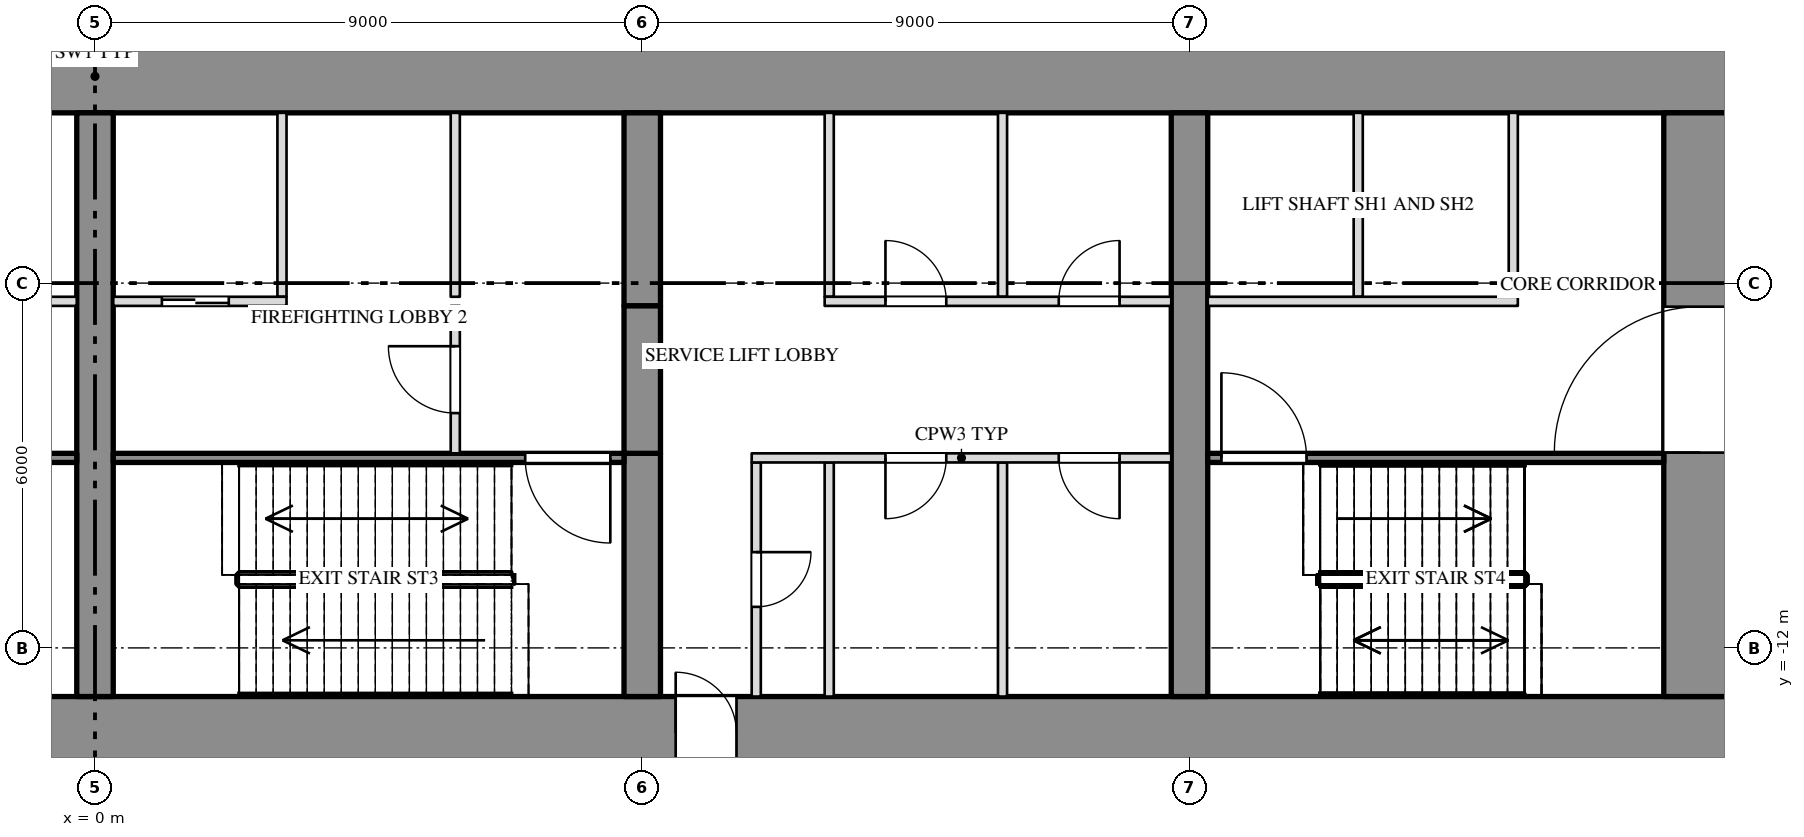
"""IFC4 building model, lengths in metres.
Left out: names, types, materials, properties, quantities, classifications, styles, units other than length and angle.
Written with IfcOpenShell. Run it as: python <this file> out.ifc"""

import sys

from ifc_helpers import new_model, si_unit, direction, frame, frame_2d, origin, place, context, subcontext, project, spatial, rectangle, extrude, element, fill, save


model = new_model("IFC4")
c1 = context("Model", 3, precision=1e-05, world=origin(), true_north=direction((0.0, 1.0)))
c2 = subcontext(c1, "Body", "Model", "MODEL_VIEW")
j1 = project(units=[si_unit("LENGTHUNIT", "METRE"), si_unit("PLANEANGLEUNIT", "RADIAN")], contexts=[c1])
p1 = place(None, origin())
s1 = spatial("IfcSite", under=j1, at=p1, CompositionType="ELEMENT")
p2 = place(p1, origin())
s2 = spatial("IfcBuilding", under=s1, at=p2, CompositionType="ELEMENT")
p3 = place(p2, frame((0.0, 0.0, 27.0)))
s3 = spatial("IfcBuildingStorey", under=s2, at=p3, CompositionType="ELEMENT", Elevation=27.0)
p4 = place(p3, frame((-27.0, -2.6, 0.0), z_axis=(0.0, 0.0, 1.0), x_axis=(1.0, 0.0, 0.0)))
e1 = element("IfcWall", 1, at=p4, inside=s3, PredefinedType="SHEAR", context=c2, shape_type="SweptSolid", body=[
    extrude(rectangle(XDim=54.0, YDim=1.2, at=frame_2d((27.0, 0.0))), origin(), (0.0, 0.0, 1.0), 5.7),
])
p5 = place(p3, frame((-27.0, -13.4, 0.0), z_axis=(0.0, 0.0, 1.0), x_axis=(1.0, 0.0, 0.0)))
e2 = element("IfcWall", 2, at=p5, inside=s3, PredefinedType="SHEAR", context=c2, shape_type="SweptSolid", body=[
    extrude(rectangle(XDim=54.0, YDim=1.2, at=frame_2d((27.0, 0.0))), origin(), (0.0, 0.0, 1.0), 5.7),
])
p6 = place(p5, frame((16.45, 0.0, 0.0)))
e3 = element("IfcOpeningElement", 3, at=p6, cuts=e2, PredefinedType="OPENING", context=c2, shape_type="SweptSolid", body=[
    extrude(rectangle(XDim=1.0, YDim=2.1, at=frame_2d((0.5, 1.05))), frame((0.0, 0.612, 0.0), z_axis=(0.0, -1.0, 0.0), x_axis=(1.0, 0.0, 0.0)), (0.0, 0.0, 1.0), 1.224),
])
p7 = place(p5, frame((36.55, 0.0, 0.0)))
e4 = element("IfcOpeningElement", 4, at=p7, cuts=e2, PredefinedType="OPENING", context=c2, shape_type="SweptSolid", body=[
    extrude(rectangle(XDim=1.0, YDim=2.1, at=frame_2d((0.5, 1.05))), frame((0.0, 0.612, 0.0), z_axis=(0.0, -1.0, 0.0), x_axis=(1.0, 0.0, 0.0)), (0.0, 0.0, 1.0), 1.224),
])
p8 = place(p3, frame((26.4, -12.8, 0.0), z_axis=(0.0, 0.0, 1.0), x_axis=(0.0, 1.0, 0.0)))
e5 = element("IfcWall", 5, at=p8, inside=s3, PredefinedType="SHEAR", context=c2, shape_type="SweptSolid", body=[
    extrude(rectangle(XDim=9.6, YDim=1.2, at=frame_2d((4.8, 0.0))), origin(), (0.0, 0.0, 1.0), 5.7),
])
p9 = place(p8, frame((4.012, 0.0, 0.0)))
e6 = element("IfcOpeningElement", 6, at=p9, cuts=e5, PredefinedType="OPENING", context=c2, shape_type="SweptSolid", body=[
    extrude(rectangle(XDim=2.4, YDim=2.1, at=frame_2d((1.2, 1.05))), frame((0.0, 0.612, 0.0), z_axis=(0.0, -1.0, 0.0), x_axis=(1.0, 0.0, 0.0)), (0.0, 0.0, 1.0), 1.224),
])
p10 = place(p3, frame((0.0, -12.8, 0.0), z_axis=(0.0, 0.0, 1.0), x_axis=(0.0, 1.0, 0.0)))
e7 = element("IfcWall", 7, at=p10, inside=s3, PredefinedType="SHEAR", context=c2, shape_type="SweptSolid", body=[
    extrude(rectangle(XDim=9.6, YDim=0.6, at=frame_2d((4.8, 0.0))), origin(), (0.0, 0.0, 1.0), 5.7),
])
p11 = place(p3, frame((9.0, -12.8, 0.0), z_axis=(0.0, 0.0, 1.0), x_axis=(0.0, 1.0, 0.0)))
e8 = element("IfcWall", 8, at=p11, inside=s3, PredefinedType="SHEAR", context=c2, shape_type="SweptSolid", body=[
    extrude(rectangle(XDim=4.0, YDim=0.6, at=frame_2d((2.0, 0.0))), origin(), (0.0, 0.0, 1.0), 5.7),
])
p12 = place(p3, frame((9.0, -6.375, 0.0), z_axis=(0.0, 0.0, 1.0), x_axis=(0.0, 1.0, 0.0)))
e9 = element("IfcWall", 9, at=p12, inside=s3, PredefinedType="SHEAR", context=c2, shape_type="SweptSolid", body=[
    extrude(rectangle(XDim=3.175, YDim=0.6, at=frame_2d((1.587, 0.0))), origin(), (0.0, 0.0, 1.0), 5.7),
])
p13 = place(p3, frame((9.0, -8.8, 3.6), z_axis=(0.0, 0.0, 1.0), x_axis=(0.0, 1.0, 0.0)))
e10 = element("IfcWall", 10, at=p13, inside=s3, PredefinedType="SHEAR", context=c2, shape_type="SweptSolid", body=[
    extrude(rectangle(XDim=2.425, YDim=0.6, at=frame_2d((1.212, 0.0))), origin(), (0.0, 0.0, 1.0), 2.1),
])
p14 = place(p3, frame((18.0, -12.8, 0.0), z_axis=(0.0, 0.0, 1.0), x_axis=(0.0, 1.0, 0.0)))
e11 = element("IfcWall", 11, at=p14, inside=s3, PredefinedType="SHEAR", context=c2, shape_type="SweptSolid", body=[
    extrude(rectangle(XDim=9.6, YDim=0.6, at=frame_2d((4.8, 0.0))), origin(), (0.0, 0.0, 1.0), 5.7),
])
for number, where, z_axis, x_axis in (
    (12, (3.075, -6.225, 0.0), (0.0, 0.0, 1.0), (0.0, 1.0, 0.0)),
    (13, (5.925, -6.225, 0.0), (0.0, 0.0, 1.0), (0.0, 1.0, 0.0)),
    (14, (12.075, -6.225, 0.0), (0.0, 0.0, 1.0), (0.0, 1.0, 0.0)),
    (15, (14.925, -6.225, 0.0), (0.0, 0.0, 1.0), (0.0, 1.0, 0.0)),
    (16, (20.775, -6.225, 0.0), (0.0, 0.0, 1.0), (0.0, 1.0, 0.0)),
    (17, (23.325, -6.225, 0.0), (0.0, 0.0, 1.0), (0.0, 1.0, 0.0)),
):
    element("IfcWall", number, at=place(p3, frame(where, z_axis=z_axis, x_axis=x_axis)), inside=s3, PredefinedType="PARTITIONING", context=c2, shape_type="SweptSolid", body=[
        extrude(rectangle(XDim=3.025, YDim=0.15, at=frame_2d((1.513, 0.0))), origin(), (0.0, 0.0, 1.0), 5.7),
    ])
p15 = place(p3, frame((10.875, -12.8, 0.0), z_axis=(0.0, 0.0, 1.0), x_axis=(0.0, 1.0, 0.0)))
e18 = element("IfcWall", 18, at=p15, inside=s3, PredefinedType="PARTITIONING", context=c2, shape_type="SweptSolid", body=[
    extrude(rectangle(XDim=3.85, YDim=0.15, at=frame_2d((1.925, 0.0))), origin(), (0.0, 0.0, 1.0), 5.7),
])
p16 = place(p15, frame((1.475, 0.0, 0.0)))
e19 = element("IfcOpeningElement", 19, at=p16, cuts=e18, PredefinedType="OPENING", context=c2, shape_type="SweptSolid", body=[
    extrude(rectangle(XDim=0.9, YDim=2.1, at=frame_2d((0.45, 1.05))), frame((0.0, 0.087, 0.0), z_axis=(0.0, -1.0, 0.0), x_axis=(1.0, 0.0, 0.0)), (0.0, 0.0, 1.0), 0.174),
])
for number, where, z_axis, x_axis in (
    (20, (12.075, -12.8, 0.0), (0.0, 0.0, 1.0), (0.0, 1.0, 0.0)),
    (21, (14.925, -12.8, 0.0), (0.0, 0.0, 1.0), (0.0, 1.0, 0.0)),
):
    element("IfcWall", number, at=place(p3, frame(where, z_axis=z_axis, x_axis=x_axis)), inside=s3, PredefinedType="PARTITIONING", context=c2, shape_type="SweptSolid", body=[
        extrude(rectangle(XDim=3.85, YDim=0.15, at=frame_2d((1.925, 0.0))), origin(), (0.0, 0.0, 1.0), 5.7),
    ])
p17 = place(p3, frame((5.925, -8.8, 0.0), z_axis=(0.0, 0.0, 1.0), x_axis=(0.0, 1.0, 0.0)))
e22 = element("IfcWall", 22, at=p17, inside=s3, PredefinedType="PARTITIONING", context=c2, shape_type="SweptSolid", body=[
    extrude(rectangle(XDim=2.425, YDim=0.15, at=frame_2d((1.212, 0.0))), origin(), (0.0, 0.0, 1.0), 5.7),
])
p18 = place(p17, frame((0.662, 0.0, 0.0)))
e23 = element("IfcOpeningElement", 23, at=p18, cuts=e22, PredefinedType="OPENING", context=c2, shape_type="SweptSolid", body=[
    extrude(rectangle(XDim=1.1, YDim=2.1, at=frame_2d((0.55, 1.05))), frame((0.0, 0.087, 0.0), z_axis=(0.0, -1.0, 0.0), x_axis=(1.0, 0.0, 0.0)), (0.0, 0.0, 1.0), 0.174),
])
p19 = place(p3, frame((-3.15, -6.3, 0.0), z_axis=(0.0, 0.0, 1.0), x_axis=(1.0, 0.0, 0.0)))
e24 = element("IfcWall", 24, at=p19, inside=s3, PredefinedType="PARTITIONING", context=c2, shape_type="SweptSolid", body=[
    extrude(rectangle(XDim=2.85, YDim=0.15, at=frame_2d((1.425, 0.0))), origin(), (0.0, 0.0, 1.0), 5.7),
])
p20 = place(p19, frame((0.95, 0.0, 0.0)))
e25 = element("IfcOpeningElement", 25, at=p20, cuts=e24, PredefinedType="OPENING", context=c2, shape_type="SweptSolid", body=[
    extrude(rectangle(XDim=1.1, YDim=2.1, at=frame_2d((0.55, 1.05))), frame((0.0, 0.087, 0.0), z_axis=(0.0, -1.0, 0.0), x_axis=(1.0, 0.0, 0.0)), (0.0, 0.0, 1.0), 0.174),
])
p21 = place(p3, frame((0.3, -6.3, 0.0), z_axis=(0.0, 0.0, 1.0), x_axis=(1.0, 0.0, 0.0)))
e26 = element("IfcWall", 26, at=p21, inside=s3, PredefinedType="PARTITIONING", context=c2, shape_type="SweptSolid", body=[
    extrude(rectangle(XDim=2.85, YDim=0.15, at=frame_2d((1.425, 0.0))), origin(), (0.0, 0.0, 1.0), 5.7),
])
p22 = place(p21, frame((0.8, 0.0, 0.0)))
e27 = element("IfcOpeningElement", 27, at=p22, cuts=e26, PredefinedType="OPENING", context=c2, shape_type="SweptSolid", body=[
    extrude(rectangle(XDim=1.1, YDim=2.1, at=frame_2d((0.55, 1.05))), frame((0.0, 0.087, 0.0), z_axis=(0.0, -1.0, 0.0), x_axis=(1.0, 0.0, 0.0)), (0.0, 0.0, 1.0), 0.174),
])
p23 = place(p3, frame((12.0, -6.3, 0.0), z_axis=(0.0, 0.0, 1.0), x_axis=(1.0, 0.0, 0.0)))
e28 = element("IfcWall", 28, at=p23, inside=s3, PredefinedType="PARTITIONING", context=c2, shape_type="SweptSolid", body=[
    extrude(rectangle(XDim=5.7, YDim=0.15, at=frame_2d((2.85, 0.0))), origin(), (0.0, 0.0, 1.0), 5.7),
])
p24 = place(p23, frame((1.0, 0.0, 0.0)))
e29 = element("IfcOpeningElement", 29, at=p24, cuts=e28, PredefinedType="OPENING", context=c2, shape_type="SweptSolid", body=[
    extrude(rectangle(XDim=1.0, YDim=2.1, at=frame_2d((0.5, 1.05))), frame((0.0, 0.087, 0.0), z_axis=(0.0, -1.0, 0.0), x_axis=(1.0, 0.0, 0.0)), (0.0, 0.0, 1.0), 0.174),
])
p25 = place(p23, frame((3.85, 0.0, 0.0)))
e30 = element("IfcOpeningElement", 30, at=p25, cuts=e28, PredefinedType="OPENING", context=c2, shape_type="SweptSolid", body=[
    extrude(rectangle(XDim=1.0, YDim=2.1, at=frame_2d((0.5, 1.05))), frame((0.0, 0.087, 0.0), z_axis=(0.0, -1.0, 0.0), x_axis=(1.0, 0.0, 0.0)), (0.0, 0.0, 1.0), 0.174),
])
p26 = place(p3, frame((18.3, -6.3, 0.0), z_axis=(0.0, 0.0, 1.0), x_axis=(1.0, 0.0, 0.0)))
e31 = element("IfcWall", 31, at=p26, inside=s3, PredefinedType="PARTITIONING", context=c2, shape_type="SweptSolid", body=[
    extrude(rectangle(XDim=5.1, YDim=0.15, at=frame_2d((2.55, 0.0))), origin(), (0.0, 0.0, 1.0), 5.7),
])
p27 = place(p3, frame((-8.7, -8.875, 0.0), z_axis=(0.0, 0.0, 1.0), x_axis=(1.0, 0.0, 0.0)))
e32 = element("IfcWall", 32, at=p27, inside=s3, PredefinedType="SHEAR", context=c2, shape_type="SweptSolid", body=[
    extrude(rectangle(XDim=8.4, YDim=0.15, at=frame_2d((4.2, 0.0))), origin(), (0.0, 0.0, 1.0), 5.7),
])
p28 = place(p27, frame((0.225, 0.0, 0.0)))
e33 = element("IfcOpeningElement", 33, at=p28, cuts=e32, PredefinedType="OPENING", context=c2, shape_type="SweptSolid", body=[
    extrude(rectangle(XDim=1.4, YDim=2.1, at=frame_2d((0.7, 1.05))), frame((0.0, 0.087, 0.0), z_axis=(0.0, -1.0, 0.0), x_axis=(1.0, 0.0, 0.0)), (0.0, 0.0, 1.0), 0.174),
])
p29 = place(p3, frame((0.3, -8.875, 0.0), z_axis=(0.0, 0.0, 1.0), x_axis=(1.0, 0.0, 0.0)))
e34 = element("IfcWall", 34, at=p29, inside=s3, PredefinedType="SHEAR", context=c2, shape_type="SweptSolid", body=[
    extrude(rectangle(XDim=8.4, YDim=0.15, at=frame_2d((4.2, 0.0))), origin(), (0.0, 0.0, 1.0), 5.7),
])
p30 = place(p29, frame((6.775, 0.0, 0.0)))
e35 = element("IfcOpeningElement", 35, at=p30, cuts=e34, PredefinedType="OPENING", context=c2, shape_type="SweptSolid", body=[
    extrude(rectangle(XDim=1.4, YDim=2.1, at=frame_2d((0.7, 1.05))), frame((0.0, 0.087, 0.0), z_axis=(0.0, -1.0, 0.0), x_axis=(1.0, 0.0, 0.0)), (0.0, 0.0, 1.0), 0.174),
])
p31 = place(p3, frame((10.8, -8.875, 0.0), z_axis=(0.0, 0.0, 1.0), x_axis=(1.0, 0.0, 0.0)))
e36 = element("IfcWall", 36, at=p31, inside=s3, PredefinedType="PARTITIONING", context=c2, shape_type="SweptSolid", body=[
    extrude(rectangle(XDim=6.9, YDim=0.15, at=frame_2d((3.45, 0.0))), origin(), (0.0, 0.0, 1.0), 5.7),
])
p32 = place(p31, frame((2.2, 0.0, 0.0)))
e37 = element("IfcOpeningElement", 37, at=p32, cuts=e36, PredefinedType="OPENING", context=c2, shape_type="SweptSolid", body=[
    extrude(rectangle(XDim=1.0, YDim=2.1, at=frame_2d((0.5, 1.05))), frame((0.0, 0.087, 0.0), z_axis=(0.0, -1.0, 0.0), x_axis=(1.0, 0.0, 0.0)), (0.0, 0.0, 1.0), 0.174),
])
p33 = place(p31, frame((5.05, 0.0, 0.0)))
e38 = element("IfcOpeningElement", 38, at=p33, cuts=e36, PredefinedType="OPENING", context=c2, shape_type="SweptSolid", body=[
    extrude(rectangle(XDim=1.0, YDim=2.1, at=frame_2d((0.5, 1.05))), frame((0.0, 0.087, 0.0), z_axis=(0.0, -1.0, 0.0), x_axis=(1.0, 0.0, 0.0)), (0.0, 0.0, 1.0), 0.174),
])
p34 = place(p3, frame((18.3, -8.875, 0.0), z_axis=(0.0, 0.0, 1.0), x_axis=(1.0, 0.0, 0.0)))
e39 = element("IfcWall", 39, at=p34, inside=s3, PredefinedType="SHEAR", context=c2, shape_type="SweptSolid", body=[
    extrude(rectangle(XDim=7.5, YDim=0.15, at=frame_2d((3.75, 0.0))), origin(), (0.0, 0.0, 1.0), 5.7),
])
p35 = place(p34, frame((0.225, 0.0, 0.0)))
e40 = element("IfcOpeningElement", 40, at=p35, cuts=e39, PredefinedType="OPENING", context=c2, shape_type="SweptSolid", body=[
    extrude(rectangle(XDim=1.4, YDim=2.1, at=frame_2d((0.7, 1.05))), frame((0.0, 0.087, 0.0), z_axis=(0.0, -1.0, 0.0), x_axis=(1.0, 0.0, 0.0)), (0.0, 0.0, 1.0), 0.174),
])
p36 = place(p22, origin())
e41 = element("IfcDoor", 41, at=p36, inside=s3, OperationType="SLIDING_TO_RIGHT", PredefinedType="DOOR", context=c2, shape_type="SweptSolid", body=[
    extrude(rectangle(XDim=1.1, YDim=2.1, at=frame_2d((0.55, 1.05))), frame((0.0, 0.025, 0.0), z_axis=(0.0, -1.0, 0.0), x_axis=(1.0, 0.0, 0.0)), (0.0, 0.0, 1.0), 0.05),
])
fill(e27, e41)
p37 = place(p18, origin())
e42 = element("IfcDoor", 42, at=p37, inside=s3, OperationType="SINGLE_SWING_RIGHT", PredefinedType="DOOR", context=c2, shape_type="SweptSolid", body=[
    extrude(rectangle(XDim=1.1, YDim=2.1, at=frame_2d((0.55, 1.05))), frame((0.0, 0.025, 0.0), z_axis=(0.0, -1.0, 0.0), x_axis=(1.0, 0.0, 0.0)), (0.0, 0.0, 1.0), 0.05),
])
fill(e23, e42)
p38 = place(p30, origin())
e43 = element("IfcDoor", 43, at=p38, inside=s3, OperationType="DOUBLE_DOOR_SINGLE_SWING", PredefinedType="DOOR", context=c2, shape_type="SweptSolid", body=[
    extrude(rectangle(XDim=1.4, YDim=2.1, at=frame_2d((0.7, 1.05))), frame((0.0, 0.025, 0.0), z_axis=(0.0, -1.0, 0.0), x_axis=(1.0, 0.0, 0.0)), (0.0, 0.0, 1.0), 0.05),
])
fill(e35, e43)
p39 = place(p7, origin())
e44 = element("IfcDoor", 44, at=p39, inside=s3, OperationType="SINGLE_SWING_LEFT", PredefinedType="DOOR", context=c2, shape_type="SweptSolid", body=[
    extrude(rectangle(XDim=1.0, YDim=2.1, at=frame_2d((0.5, 1.05))), frame((0.0, 0.025, 0.0), z_axis=(0.0, -1.0, 0.0), x_axis=(1.0, 0.0, 0.0)), (0.0, 0.0, 1.0), 0.05),
])
fill(e4, e44)
p40 = place(p16, origin())
e45 = element("IfcDoor", 45, at=p40, inside=s3, OperationType="SINGLE_SWING_LEFT", PredefinedType="DOOR", context=c2, shape_type="SweptSolid", body=[
    extrude(rectangle(XDim=0.9, YDim=2.1, at=frame_2d((0.45, 1.05))), frame((0.0, 0.025, 0.0), z_axis=(0.0, -1.0, 0.0), x_axis=(1.0, 0.0, 0.0)), (0.0, 0.0, 1.0), 0.05),
])
fill(e19, e45)
p41 = place(p32, origin())
e46 = element("IfcDoor", 46, at=p41, inside=s3, OperationType="SINGLE_SWING_RIGHT", PredefinedType="DOOR", context=c2, shape_type="SweptSolid", body=[
    extrude(rectangle(XDim=1.0, YDim=2.1, at=frame_2d((0.5, 1.05))), frame((0.0, 0.025, 0.0), z_axis=(0.0, -1.0, 0.0), x_axis=(1.0, 0.0, 0.0)), (0.0, 0.0, 1.0), 0.05),
])
fill(e37, e46)
p42 = place(p24, origin())
e47 = element("IfcDoor", 47, at=p42, inside=s3, OperationType="SINGLE_SWING_LEFT", PredefinedType="DOOR", context=c2, shape_type="SweptSolid", body=[
    extrude(rectangle(XDim=1.0, YDim=2.1, at=frame_2d((0.5, 1.05))), frame((0.0, 0.025, 0.0), z_axis=(0.0, -1.0, 0.0), x_axis=(1.0, 0.0, 0.0)), (0.0, 0.0, 1.0), 0.05),
])
fill(e29, e47)
p43 = place(p33, origin())
e48 = element("IfcDoor", 48, at=p43, inside=s3, OperationType="SINGLE_SWING_LEFT", PredefinedType="DOOR", context=c2, shape_type="SweptSolid", body=[
    extrude(rectangle(XDim=1.0, YDim=2.1, at=frame_2d((0.5, 1.05))), frame((0.0, 0.025, 0.0), z_axis=(0.0, -1.0, 0.0), x_axis=(1.0, 0.0, 0.0)), (0.0, 0.0, 1.0), 0.05),
])
fill(e38, e48)
p44 = place(p25, origin())
e49 = element("IfcDoor", 49, at=p44, inside=s3, OperationType="SINGLE_SWING_RIGHT", PredefinedType="DOOR", context=c2, shape_type="SweptSolid", body=[
    extrude(rectangle(XDim=1.0, YDim=2.1, at=frame_2d((0.5, 1.05))), frame((0.0, 0.025, 0.0), z_axis=(0.0, -1.0, 0.0), x_axis=(1.0, 0.0, 0.0)), (0.0, 0.0, 1.0), 0.05),
])
fill(e30, e49)
p45 = place(p35, origin())
e50 = element("IfcDoor", 50, at=p45, inside=s3, OperationType="DOUBLE_DOOR_SINGLE_SWING", PredefinedType="DOOR", context=c2, shape_type="SweptSolid", body=[
    extrude(rectangle(XDim=1.4, YDim=2.1, at=frame_2d((0.7, 1.05))), frame((0.0, 0.025, 0.0), z_axis=(0.0, -1.0, 0.0), x_axis=(1.0, 0.0, 0.0)), (0.0, 0.0, 1.0), 0.05),
])
fill(e40, e50)
p46 = place(p9, origin())
e51 = element("IfcDoor", 51, at=p46, inside=s3, OperationType="DOUBLE_DOOR_SINGLE_SWING", PredefinedType="DOOR", context=c2, shape_type="SweptSolid", body=[
    extrude(rectangle(XDim=2.4, YDim=2.1, at=frame_2d((1.2, 1.05))), frame((0.0, 0.025, 0.0), z_axis=(0.0, -1.0, 0.0), x_axis=(1.0, 0.0, 0.0)), (0.0, 0.0, 1.0), 0.05),
])
fill(e6, e51)
save(model, sys.argv[1])
